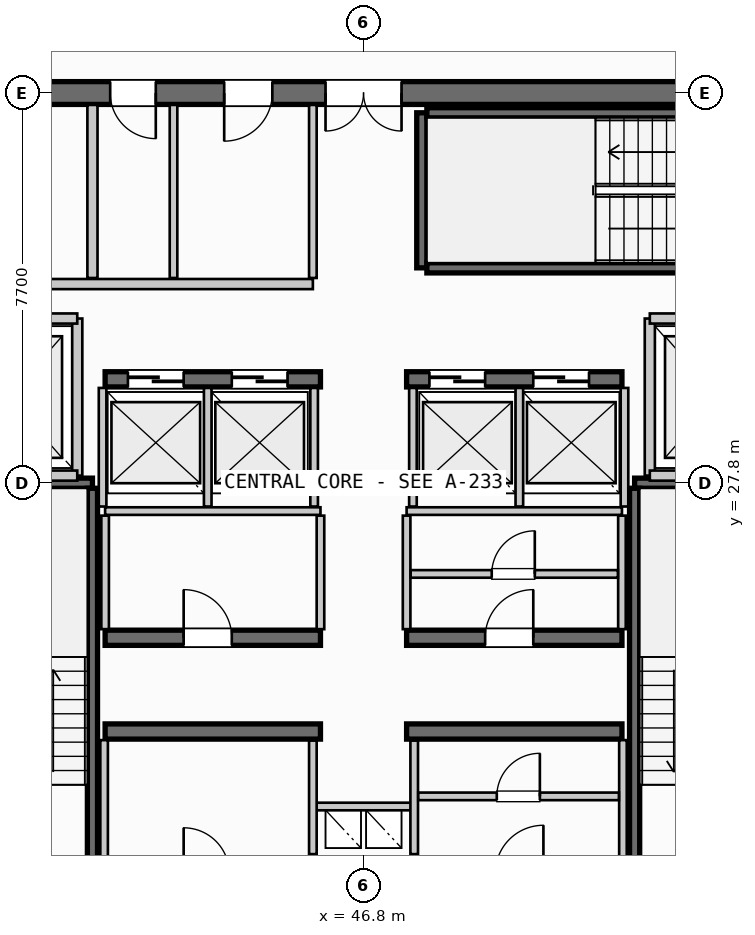
"""IFC4 building model, lengths in metres.
Left out: names, types, materials, properties, quantities, classifications, styles, units other than length and angle.
Written with IfcOpenShell. Run it as: python <this file> out.ifc"""

import sys

from ifc_helpers import new_model, si_unit, direction, frame, frame_2d, origin, place, context, subcontext, project, spatial, rectangle, extrude, source, transform, mapped, element, fill, save


model = new_model("IFC4")
c1 = context("Model", 3, precision=1e-05, world=origin(), true_north=direction((0.0, 1.0)))
c2 = subcontext(c1, "Body", "Model", "MODEL_VIEW")
j1 = project(units=[si_unit("LENGTHUNIT", "METRE"), si_unit("PLANEANGLEUNIT", "RADIAN")], contexts=[c1])
p1 = place(None, origin())
s1 = spatial("IfcSite", under=j1, at=p1, CompositionType="ELEMENT")
p2 = place(p1, origin())
s2 = spatial("IfcBuilding", under=s1, at=p2, CompositionType="ELEMENT")
p3 = place(p2, frame((0.0, 0.0, 242.2)))
s3 = spatial("IfcBuildingStorey", under=s2, at=p3, CompositionType="ELEMENT", Elevation=242.2)
p4 = place(p3, frame((55.6, 35.5, 0.0), z_axis=(0.0, 0.0, 1.0), x_axis=(-1.0, 0.0, 0.0)))
e1 = element("IfcWall", 1, at=p4, inside=s3, PredefinedType="SHEAR", context=c2, shape_type="SweptSolid", body=[
    extrude(rectangle(XDim=17.6, YDim=0.45, at=frame_2d((8.8, 0.0))), origin(), (0.0, 0.0, 1.0), 3.21),
])
p5 = place(p4, frame((8.05, 0.0, 0.0)))
e2 = element("IfcOpeningElement", 2, at=p5, cuts=e1, PredefinedType="OPENING", context=c2, shape_type="SweptSolid", body=[
    extrude(rectangle(XDim=1.5, YDim=2.2, at=frame_2d((0.75, 1.1))), frame((0.0, 0.235, 0.0), z_axis=(0.0, -1.0, 0.0), x_axis=(1.0, 0.0, 0.0)), (0.0, 0.0, 1.0), 0.47),
])
p6 = place(p4, frame((15.1, 0.0, 0.0)))
e3 = element("IfcOpeningElement", 3, at=p6, cuts=e1, PredefinedType="OPENING", context=c2, shape_type="SweptSolid", body=[
    extrude(rectangle(XDim=0.95, YDim=2.15, at=frame_2d((0.475, 1.075))), frame((0.0, 0.235, 0.0), z_axis=(0.0, -1.0, 0.0), x_axis=(1.0, 0.0, 0.0)), (0.0, 0.0, 1.0), 0.47),
])
p7 = place(p4, frame((12.9, 0.0, 0.0)))
e4 = element("IfcOpeningElement", 4, at=p7, cuts=e1, PredefinedType="OPENING", context=c2, shape_type="SweptSolid", body=[
    extrude(rectangle(XDim=0.9, YDim=2.15, at=frame_2d((0.45, 1.075))), frame((0.0, 0.235, 0.0), z_axis=(0.0, -1.0, 0.0), x_axis=(1.0, 0.0, 0.0)), (0.0, 0.0, 1.0), 0.47),
])
p8 = place(p4, frame((10.6, 0.0, 0.0)))
e5 = element("IfcOpeningElement", 5, at=p8, cuts=e1, PredefinedType="OPENING", context=c2, shape_type="SweptSolid", body=[
    extrude(rectangle(XDim=0.95, YDim=2.15, at=frame_2d((0.475, 1.075))), frame((0.0, 0.235, 0.0), z_axis=(0.0, -1.0, 0.0), x_axis=(1.0, 0.0, 0.0)), (0.0, 0.0, 1.0), 0.47),
])
for number, where, z_axis, x_axis in (
    (6, (41.7, 22.9, 0.0), (0.0, 0.0, 1.0), (1.0, 0.0, 0.0)),
    (7, (47.65, 22.9, 0.0), (0.0, 0.0, 1.0), (1.0, 0.0, 0.0)),
):
    element("IfcWall", number, at=place(p3, frame(where, z_axis=z_axis, x_axis=x_axis)), inside=s3, PredefinedType="SHEAR", context=c2, shape_type="SweptSolid", body=[
        extrude(rectangle(XDim=4.25, YDim=0.3, at=frame_2d((2.125, 0.0))), origin(), (0.0, 0.0, 1.0), 3.21),
    ])
p9 = place(p3, frame((41.7, 24.75, 0.0), z_axis=(0.0, 0.0, 1.0), x_axis=(1.0, 0.0, 0.0)))
e8 = element("IfcWall", 8, at=p9, inside=s3, PredefinedType="SHEAR", context=c2, shape_type="SweptSolid", body=[
    extrude(rectangle(XDim=4.25, YDim=0.3, at=frame_2d((2.125, 0.0))), origin(), (0.0, 0.0, 1.0), 3.21),
])
p10 = place(p9, frame((1.55, 0.0, 0.0)))
e9 = element("IfcOpeningElement", 9, at=p10, cuts=e8, PredefinedType="OPENING", context=c2, shape_type="SweptSolid", body=[
    extrude(rectangle(XDim=0.95, YDim=2.15, at=frame_2d((0.475, 1.075))), frame((0.0, 0.16, 0.0), z_axis=(0.0, -1.0, 0.0), x_axis=(1.0, 0.0, 0.0)), (0.0, 0.0, 1.0), 0.32),
])
p11 = place(p3, frame((47.65, 24.75, 0.0), z_axis=(0.0, 0.0, 1.0), x_axis=(1.0, 0.0, 0.0)))
e10 = element("IfcWall", 10, at=p11, inside=s3, PredefinedType="SHEAR", context=c2, shape_type="SweptSolid", body=[
    extrude(rectangle(XDim=4.25, YDim=0.3, at=frame_2d((2.125, 0.0))), origin(), (0.0, 0.0, 1.0), 3.21),
])
p12 = place(p11, frame((1.55, 0.0, 0.0)))
e11 = element("IfcOpeningElement", 11, at=p12, cuts=e10, PredefinedType="OPENING", context=c2, shape_type="SweptSolid", body=[
    extrude(rectangle(XDim=0.95, YDim=2.15, at=frame_2d((0.475, 1.075))), frame((0.0, 0.16, 0.0), z_axis=(0.0, -1.0, 0.0), x_axis=(1.0, 0.0, 0.0)), (0.0, 0.0, 1.0), 0.32),
])
p13 = place(p3, frame((41.7, 29.85, 0.0), z_axis=(0.0, 0.0, 1.0), x_axis=(1.0, 0.0, 0.0)))
e12 = element("IfcWall", 12, at=p13, inside=s3, PredefinedType="SHEAR", context=c2, shape_type="SweptSolid", body=[
    extrude(rectangle(XDim=4.25, YDim=0.3, at=frame_2d((2.125, 0.0))), origin(), (0.0, 0.0, 1.0), 3.21),
])
p14 = place(p13, frame((0.45, 0.0, 0.0)))
e13 = element("IfcOpeningElement", 13, at=p14, cuts=e12, PredefinedType="OPENING", context=c2, shape_type="SweptSolid", body=[
    extrude(rectangle(XDim=1.1, YDim=2.2, at=frame_2d((0.55, 1.1))), frame((0.0, 0.16, 0.0), z_axis=(0.0, -1.0, 0.0), x_axis=(1.0, 0.0, 0.0)), (0.0, 0.0, 1.0), 0.32),
])
p15 = place(p13, frame((2.5, 0.0, 0.0)))
e14 = element("IfcOpeningElement", 14, at=p15, cuts=e12, PredefinedType="OPENING", context=c2, shape_type="SweptSolid", body=[
    extrude(rectangle(XDim=1.1, YDim=2.2, at=frame_2d((0.55, 1.1))), frame((0.0, 0.16, 0.0), z_axis=(0.0, -1.0, 0.0), x_axis=(1.0, 0.0, 0.0)), (0.0, 0.0, 1.0), 0.32),
])
p16 = place(p3, frame((47.65, 29.85, 0.0), z_axis=(0.0, 0.0, 1.0), x_axis=(1.0, 0.0, 0.0)))
e15 = element("IfcWall", 15, at=p16, inside=s3, PredefinedType="SHEAR", context=c2, shape_type="SweptSolid", body=[
    extrude(rectangle(XDim=4.25, YDim=0.3, at=frame_2d((2.125, 0.0))), origin(), (0.0, 0.0, 1.0), 3.21),
])
p17 = place(p16, frame((0.45, 0.0, 0.0)))
e16 = element("IfcOpeningElement", 16, at=p17, cuts=e15, PredefinedType="OPENING", context=c2, shape_type="SweptSolid", body=[
    extrude(rectangle(XDim=1.1, YDim=2.2, at=frame_2d((0.55, 1.1))), frame((0.0, 0.16, 0.0), z_axis=(0.0, -1.0, 0.0), x_axis=(1.0, 0.0, 0.0)), (0.0, 0.0, 1.0), 0.32),
])
p18 = place(p16, frame((2.5, 0.0, 0.0)))
e17 = element("IfcOpeningElement", 17, at=p18, cuts=e15, PredefinedType="OPENING", context=c2, shape_type="SweptSolid", body=[
    extrude(rectangle(XDim=1.1, YDim=2.2, at=frame_2d((0.55, 1.1))), frame((0.0, 0.16, 0.0), z_axis=(0.0, -1.0, 0.0), x_axis=(1.0, 0.0, 0.0)), (0.0, 0.0, 1.0), 0.32),
])
p19 = place(p3, frame((38.39, 27.8, 0.0), z_axis=(0.0, 0.0, 1.0), x_axis=(1.0, 0.0, 0.0)))
e18 = element("IfcWall", 18, at=p19, inside=s3, PredefinedType="SHEAR", context=c2, shape_type="SweptSolid", body=[
    extrude(rectangle(XDim=3.06, YDim=0.2, at=frame_2d((1.53, 0.0))), origin(), (0.0, 0.0, 1.0), 3.21),
])
p20 = place(p3, frame((41.45, 27.7, 0.0), z_axis=(0.0, 0.0, 1.0), x_axis=(0.0, -1.0, 0.0)))
e19 = element("IfcWall", 19, at=p20, inside=s3, PredefinedType="SHEAR", context=c2, shape_type="SweptSolid", body=[
    extrude(rectangle(XDim=7.35, YDim=0.2, at=frame_2d((3.675, 0.0))), origin(), (0.0, 0.0, 1.0), 3.21),
])
p21 = place(p3, frame((52.15, 27.8, 0.0), z_axis=(0.0, 0.0, 1.0), x_axis=(1.0, 0.0, 0.0)))
e20 = element("IfcWall", 20, at=p21, inside=s3, PredefinedType="SHEAR", context=c2, shape_type="SweptSolid", body=[
    extrude(rectangle(XDim=3.06, YDim=0.2, at=frame_2d((1.53, 0.0))), origin(), (0.0, 0.0, 1.0), 3.21),
])
p22 = place(p3, frame((52.15, 20.35, 0.0), z_axis=(0.0, 0.0, 1.0), x_axis=(0.0, 1.0, 0.0)))
e21 = element("IfcWall", 21, at=p22, inside=s3, PredefinedType="SHEAR", context=c2, shape_type="SweptSolid", body=[
    extrude(rectangle(XDim=7.35, YDim=0.2, at=frame_2d((3.675, 0.0))), origin(), (0.0, 0.0, 1.0), 3.21),
])
p23 = place(p3, frame((47.95, 32.05, 0.0), z_axis=(0.0, 0.0, 1.0), x_axis=(0.0, 1.0, 0.0)))
e22 = element("IfcWall", 22, at=p23, inside=s3, PredefinedType="SHEAR", context=c2, shape_type="SweptSolid", body=[
    extrude(rectangle(XDim=3.06, YDim=0.2, at=frame_2d((1.53, 0.0))), origin(), (0.0, 0.0, 1.0), 3.21),
])
for number, where, z_axis, x_axis in (
    (23, (48.05, 35.11, 0.0), (0.0, 0.0, 1.0), (1.0, 0.0, 0.0)),
    (24, (55.4, 32.05, 0.0), (0.0, 0.0, 1.0), (-1.0, 0.0, 0.0)),
):
    element("IfcWall", number, at=place(p3, frame(where, z_axis=z_axis, x_axis=x_axis)), inside=s3, PredefinedType="SHEAR", context=c2, shape_type="SweptSolid", body=[
        extrude(rectangle(XDim=7.35, YDim=0.2, at=frame_2d((3.675, 0.0))), origin(), (0.0, 0.0, 1.0), 3.21),
    ])
p24 = place(p3, frame((45.8, 21.42, 0.0), z_axis=(0.0, 0.0, 1.0), x_axis=(1.0, 0.0, 0.0)))
e25 = element("IfcWall", 25, at=p24, inside=s3, PredefinedType="PARTITIONING", context=c2, shape_type="SweptSolid", body=[
    extrude(rectangle(XDim=2.0, YDim=0.15, at=frame_2d((1.0, 0.0))), origin(), (0.0, 0.0, 1.0), 2.28),
])
for number, where, z_axis, x_axis in (
    (26, (45.8, 20.48, 0.0), (0.0, 0.0, 1.0), (0.0, 1.0, 0.0)),
    (27, (47.8, 20.48, 0.0), (0.0, 0.0, 1.0), (0.0, 1.0, 0.0)),
):
    element("IfcWall", number, at=place(p3, frame(where, z_axis=z_axis, x_axis=x_axis)), inside=s3, PredefinedType="PARTITIONING", context=c2, shape_type="SweptSolid", body=[
        extrude(rectangle(XDim=2.24, YDim=0.15, at=frame_2d((1.12, 0.0))), origin(), (0.0, 0.0, 1.0), 2.28),
    ])
p25 = place(p3, frame((41.15, 27.95, 0.0), z_axis=(0.0, 0.0, 1.0), x_axis=(0.0, 1.0, 0.0)))
e28 = element("IfcWall", 28, at=p25, inside=s3, PredefinedType="PARTITIONING", context=c2, shape_type="SweptSolid", body=[
    extrude(rectangle(XDim=3.1, YDim=0.2, at=frame_2d((1.55, 0.0))), origin(), (0.0, 0.0, 1.0), 2.28),
])
for number, where, z_axis, x_axis in (
    (29, (38.235, 27.95, 0.0), (0.0, 0.0, 1.0), (1.0, 0.0, 0.0)),
    (30, (38.235, 31.05, 0.0), (0.0, 0.0, 1.0), (1.0, 0.0, 0.0)),
):
    element("IfcWall", number, at=place(p3, frame(where, z_axis=z_axis, x_axis=x_axis)), inside=s3, PredefinedType="PARTITIONING", context=c2, shape_type="SweptSolid", body=[
        extrude(rectangle(XDim=2.915, YDim=0.2, at=frame_2d((1.458, 0.0))), origin(), (0.0, 0.0, 1.0), 2.28),
    ])
p26 = place(p3, frame((52.45, 27.95, 0.0), z_axis=(0.0, 0.0, 1.0), x_axis=(0.0, 1.0, 0.0)))
e31 = element("IfcWall", 31, at=p26, inside=s3, PredefinedType="PARTITIONING", context=c2, shape_type="SweptSolid", body=[
    extrude(rectangle(XDim=3.1, YDim=0.2, at=frame_2d((1.55, 0.0))), origin(), (0.0, 0.0, 1.0), 2.28),
])
for number, where, z_axis, x_axis in (
    (32, (52.45, 27.95, 0.0), (0.0, 0.0, 1.0), (1.0, 0.0, 0.0)),
    (33, (52.45, 31.05, 0.0), (0.0, 0.0, 1.0), (1.0, 0.0, 0.0)),
):
    element("IfcWall", number, at=place(p3, frame(where, z_axis=z_axis, x_axis=x_axis)), inside=s3, PredefinedType="PARTITIONING", context=c2, shape_type="SweptSolid", body=[
        extrude(rectangle(XDim=2.915, YDim=0.2, at=frame_2d((1.458, 0.0))), origin(), (0.0, 0.0, 1.0), 2.28),
    ])
for number, where, z_axis, x_axis in (
    (34, (41.68, 20.335, 0.0), (0.0, 0.0, 1.0), (0.0, 1.0, 0.0)),
    (35, (51.92, 20.335, 0.0), (0.0, 0.0, 1.0), (0.0, 1.0, 0.0)),
):
    element("IfcWall", number, at=place(p3, frame(where, z_axis=z_axis, x_axis=x_axis)), inside=s3, PredefinedType="PARTITIONING", context=c2, shape_type="SweptSolid", body=[
        extrude(rectangle(XDim=2.395, YDim=0.15, at=frame_2d((1.198, 0.0))), origin(), (0.0, 0.0, 1.0), 2.28),
    ])
p27 = place(p3, frame((47.88, 21.62, 0.0), z_axis=(0.0, 0.0, 1.0), x_axis=(1.0, 0.0, 0.0)))
e36 = element("IfcWall", 36, at=p27, inside=s3, PredefinedType="PARTITIONING", context=c2, shape_type="SweptSolid", body=[
    extrude(rectangle(XDim=3.96, YDim=0.15, at=frame_2d((1.98, 0.0))), origin(), (0.0, 0.0, 1.0), 2.28),
])
p28 = place(p27, frame((1.55, 0.0, 0.0)))
e37 = element("IfcOpeningElement", 37, at=p28, cuts=e36, PredefinedType="OPENING", context=c2, shape_type="SweptSolid", body=[
    extrude(rectangle(XDim=0.85, YDim=2.15, at=frame_2d((0.425, 1.075))), frame((0.0, 0.085, 0.0), z_axis=(0.0, -1.0, 0.0), x_axis=(1.0, 0.0, 0.0)), (0.0, 0.0, 1.0), 0.17),
])
for number, where, z_axis, x_axis in (
    (38, (41.7, 27.25, 0.0), (0.0, 0.0, 1.0), (1.0, 0.0, 0.0)),
    (39, (47.65, 27.25, 0.0), (0.0, 0.0, 1.0), (1.0, 0.0, 0.0)),
):
    element("IfcWall", number, at=place(p3, frame(where, z_axis=z_axis, x_axis=x_axis)), inside=s3, PredefinedType="PARTITIONING", context=c2, shape_type="SweptSolid", body=[
        extrude(rectangle(XDim=4.25, YDim=0.15, at=frame_2d((2.125, 0.0))), origin(), (0.0, 0.0, 1.0), 2.28),
    ])
for number, where, z_axis, x_axis in (
    (40, (41.7, 24.92, 0.0), (0.0, 0.0, 1.0), (0.0, 1.0, 0.0)),
    (41, (45.95, 24.92, 0.0), (0.0, 0.0, 1.0), (0.0, 1.0, 0.0)),
    (42, (47.65, 24.92, 0.0), (0.0, 0.0, 1.0), (0.0, 1.0, 0.0)),
    (43, (51.9, 24.92, 0.0), (0.0, 0.0, 1.0), (0.0, 1.0, 0.0)),
):
    element("IfcWall", number, at=place(p3, frame(where, z_axis=z_axis, x_axis=x_axis)), inside=s3, PredefinedType="PARTITIONING", context=c2, shape_type="SweptSolid", body=[
        extrude(rectangle(XDim=2.24, YDim=0.15, at=frame_2d((1.12, 0.0))), origin(), (0.0, 0.0, 1.0), 2.28),
    ])
p29 = place(p3, frame((47.73, 26.01, 0.0), z_axis=(0.0, 0.0, 1.0), x_axis=(1.0, 0.0, 0.0)))
e44 = element("IfcWall", 44, at=p29, inside=s3, PredefinedType="PARTITIONING", context=c2, shape_type="SweptSolid", body=[
    extrude(rectangle(XDim=4.09, YDim=0.15, at=frame_2d((2.045, 0.0))), origin(), (0.0, 0.0, 1.0), 2.28),
])
p30 = place(p29, frame((1.6, 0.0, 0.0)))
e45 = element("IfcOpeningElement", 45, at=p30, cuts=e44, PredefinedType="OPENING", context=c2, shape_type="SweptSolid", body=[
    extrude(rectangle(XDim=0.85, YDim=2.15, at=frame_2d((0.425, 1.075))), frame((0.0, 0.085, 0.0), z_axis=(0.0, -1.0, 0.0), x_axis=(1.0, 0.0, 0.0)), (0.0, 0.0, 1.0), 0.17),
])
for number, where, z_axis, x_axis in (
    (46, (41.65, 27.34, 0.0), (0.0, 0.0, 1.0), (0.0, 1.0, 0.0)),
    (47, (43.725, 27.34, 0.0), (0.0, 0.0, 1.0), (0.0, 1.0, 0.0)),
    (48, (45.825, 27.34, 0.0), (0.0, 0.0, 1.0), (0.0, 1.0, 0.0)),
    (49, (47.775, 27.34, 0.0), (0.0, 0.0, 1.0), (0.0, 1.0, 0.0)),
    (50, (49.875, 27.34, 0.0), (0.0, 0.0, 1.0), (0.0, 1.0, 0.0)),
    (51, (51.95, 27.34, 0.0), (0.0, 0.0, 1.0), (0.0, 1.0, 0.0)),
):
    element("IfcWall", number, at=place(p3, frame(where, z_axis=z_axis, x_axis=x_axis)), inside=s3, PredefinedType="PARTITIONING", context=c2, shape_type="SweptSolid", body=[
        extrude(rectangle(XDim=2.34, YDim=0.15, at=frame_2d((1.17, 0.0))), origin(), (0.0, 0.0, 1.0), 2.28),
    ])
p31 = place(p3, frame((41.45, 31.85, 0.0), z_axis=(0.0, 0.0, 1.0), x_axis=(0.0, 1.0, 0.0)))
e52 = element("IfcWall", 52, at=p31, inside=s3, PredefinedType="PARTITIONING", context=c2, shape_type="SweptSolid", body=[
    extrude(rectangle(XDim=3.415, YDim=0.2, at=frame_2d((1.708, 0.0))), origin(), (0.0, 0.0, 1.0), 2.28),
])
p32 = place(p3, frame((38.235, 31.73, 0.0), z_axis=(0.0, 0.0, 1.0), x_axis=(1.0, 0.0, 0.0)))
e53 = element("IfcWall", 53, at=p32, inside=s3, PredefinedType="PARTITIONING", context=c2, shape_type="SweptSolid", body=[
    extrude(rectangle(XDim=7.565, YDim=0.2, at=frame_2d((3.782, 0.0))), origin(), (0.0, 0.0, 1.0), 2.28),
])
p33 = place(p3, frame((45.8, 31.85, 0.0), z_axis=(0.0, 0.0, 1.0), x_axis=(0.0, 1.0, 0.0)))
e54 = element("IfcWall", 54, at=p33, inside=s3, PredefinedType="PARTITIONING", context=c2, shape_type="SweptSolid", body=[
    extrude(rectangle(XDim=3.415, YDim=0.15, at=frame_2d((1.708, 0.0))), origin(), (0.0, 0.0, 1.0), 2.28),
])
p34 = place(p3, frame((43.05, 31.85, 0.0), z_axis=(0.0, 0.0, 1.0), x_axis=(0.0, 1.0, 0.0)))
e55 = element("IfcWall", 55, at=p34, inside=s3, PredefinedType="PLUMBINGWALL", context=c2, shape_type="SweptSolid", body=[
    extrude(rectangle(XDim=3.415, YDim=0.15, at=frame_2d((1.708, 0.0))), origin(), (0.0, 0.0, 1.0), 2.28),
])
m1 = source(origin(), c2, "Body", "SweptSolid", [
    extrude(rectangle(XDim=1.5, YDim=2.2, at=frame_2d((0.75, 1.1))), frame((0.0, 0.025, 0.0), z_axis=(0.0, -1.0, 0.0), x_axis=(1.0, 0.0, 0.0)), (0.0, 0.0, 1.0), 0.05),
])
p35 = place(p5, origin())
e56 = element("IfcDoor", 56, at=p35, inside=s3, OperationType="DOUBLE_DOOR_SINGLE_SWING", PredefinedType="DOOR", context=c2, shape_type="MappedRepresentation", body=[
    mapped(m1, transform((0.0, 0.0, 0.0), scale=1.0)),
])
fill(e2, e56)
m2 = source(origin(), c2, "Body", "SweptSolid", [
    extrude(rectangle(XDim=0.95, YDim=2.15, at=frame_2d((0.475, 1.075))), frame((0.0, 0.025, 0.0), z_axis=(0.0, -1.0, 0.0), x_axis=(1.0, 0.0, 0.0)), (0.0, 0.0, 1.0), 0.05),
])
p36 = place(p10, origin())
e57 = element("IfcDoor", 57, at=p36, inside=s3, OperationType="SINGLE_SWING_LEFT", PredefinedType="DOOR", context=c2, shape_type="MappedRepresentation", body=[
    mapped(m2, transform((0.0, 0.0, 0.0), scale=1.0)),
])
fill(e9, e57)
p37 = place(p12, origin())
e58 = element("IfcDoor", 58, at=p37, inside=s3, OperationType="SINGLE_SWING_RIGHT", PredefinedType="DOOR", context=c2, shape_type="MappedRepresentation", body=[
    mapped(m2, transform((0.0, 0.0, 0.0), scale=1.0)),
])
fill(e11, e58)
m3 = source(origin(), c2, "Body", "SweptSolid", [
    extrude(rectangle(XDim=1.1, YDim=2.2, at=frame_2d((0.55, 1.1))), frame((0.0, 0.025, 0.0), z_axis=(0.0, -1.0, 0.0), x_axis=(1.0, 0.0, 0.0)), (0.0, 0.0, 1.0), 0.05),
])
p38 = place(p14, origin())
e59 = element("IfcDoor", 59, at=p38, inside=s3, OperationType="SLIDING_TO_LEFT", PredefinedType="DOOR", context=c2, shape_type="MappedRepresentation", body=[
    mapped(m3, transform((0.0, 0.0, 0.0), scale=1.0)),
])
fill(e13, e59)
p39 = place(p15, origin())
e60 = element("IfcDoor", 60, at=p39, inside=s3, OperationType="SLIDING_TO_LEFT", PredefinedType="DOOR", context=c2, shape_type="MappedRepresentation", body=[
    mapped(m3, transform((0.0, 0.0, 0.0), scale=1.0)),
])
fill(e14, e60)
p40 = place(p17, origin())
e61 = element("IfcDoor", 61, at=p40, inside=s3, OperationType="SLIDING_TO_LEFT", PredefinedType="DOOR", context=c2, shape_type="MappedRepresentation", body=[
    mapped(m3, transform((0.0, 0.0, 0.0), scale=1.0)),
])
fill(e16, e61)
p41 = place(p18, origin())
e62 = element("IfcDoor", 62, at=p41, inside=s3, OperationType="SLIDING_TO_LEFT", PredefinedType="DOOR", context=c2, shape_type="MappedRepresentation", body=[
    mapped(m3, transform((0.0, 0.0, 0.0), scale=1.0)),
])
fill(e17, e62)
m4 = source(origin(), c2, "Body", "SweptSolid", [
    extrude(rectangle(XDim=0.9, YDim=2.15, at=frame_2d((0.45, 1.075))), frame((0.0, 0.025, 0.0), z_axis=(0.0, -1.0, 0.0), x_axis=(1.0, 0.0, 0.0)), (0.0, 0.0, 1.0), 0.05),
])
p42 = place(p7, origin())
e63 = element("IfcDoor", 63, at=p42, inside=s3, OperationType="SINGLE_SWING_LEFT", PredefinedType="DOOR", context=c2, shape_type="MappedRepresentation", body=[
    mapped(m4, transform((0.0, 0.0, 0.0), scale=1.0)),
])
fill(e4, e63)
p43 = place(p8, origin())
e64 = element("IfcDoor", 64, at=p43, inside=s3, OperationType="SINGLE_SWING_RIGHT", PredefinedType="DOOR", context=c2, shape_type="MappedRepresentation", body=[
    mapped(m2, transform((0.0, 0.0, 0.0), scale=1.0)),
])
fill(e5, e64)
m5 = source(origin(), c2, "Body", "SweptSolid", [
    extrude(rectangle(XDim=0.85, YDim=2.15, at=frame_2d((0.425, 1.075))), frame((0.0, 0.025, 0.0), z_axis=(0.0, -1.0, 0.0), x_axis=(1.0, 0.0, 0.0)), (0.0, 0.0, 1.0), 0.05),
])
p44 = place(p28, origin())
e65 = element("IfcDoor", 65, at=p44, inside=s3, OperationType="SINGLE_SWING_RIGHT", PredefinedType="DOOR", context=c2, shape_type="MappedRepresentation", body=[
    mapped(m5, transform((0.0, 0.0, 0.0), scale=1.0)),
])
fill(e37, e65)
p45 = place(p30, origin())
e66 = element("IfcDoor", 66, at=p45, inside=s3, OperationType="SINGLE_SWING_RIGHT", PredefinedType="DOOR", context=c2, shape_type="MappedRepresentation", body=[
    mapped(m5, transform((0.0, 0.0, 0.0), scale=1.0)),
])
fill(e45, e66)
save(model, sys.argv[1])
